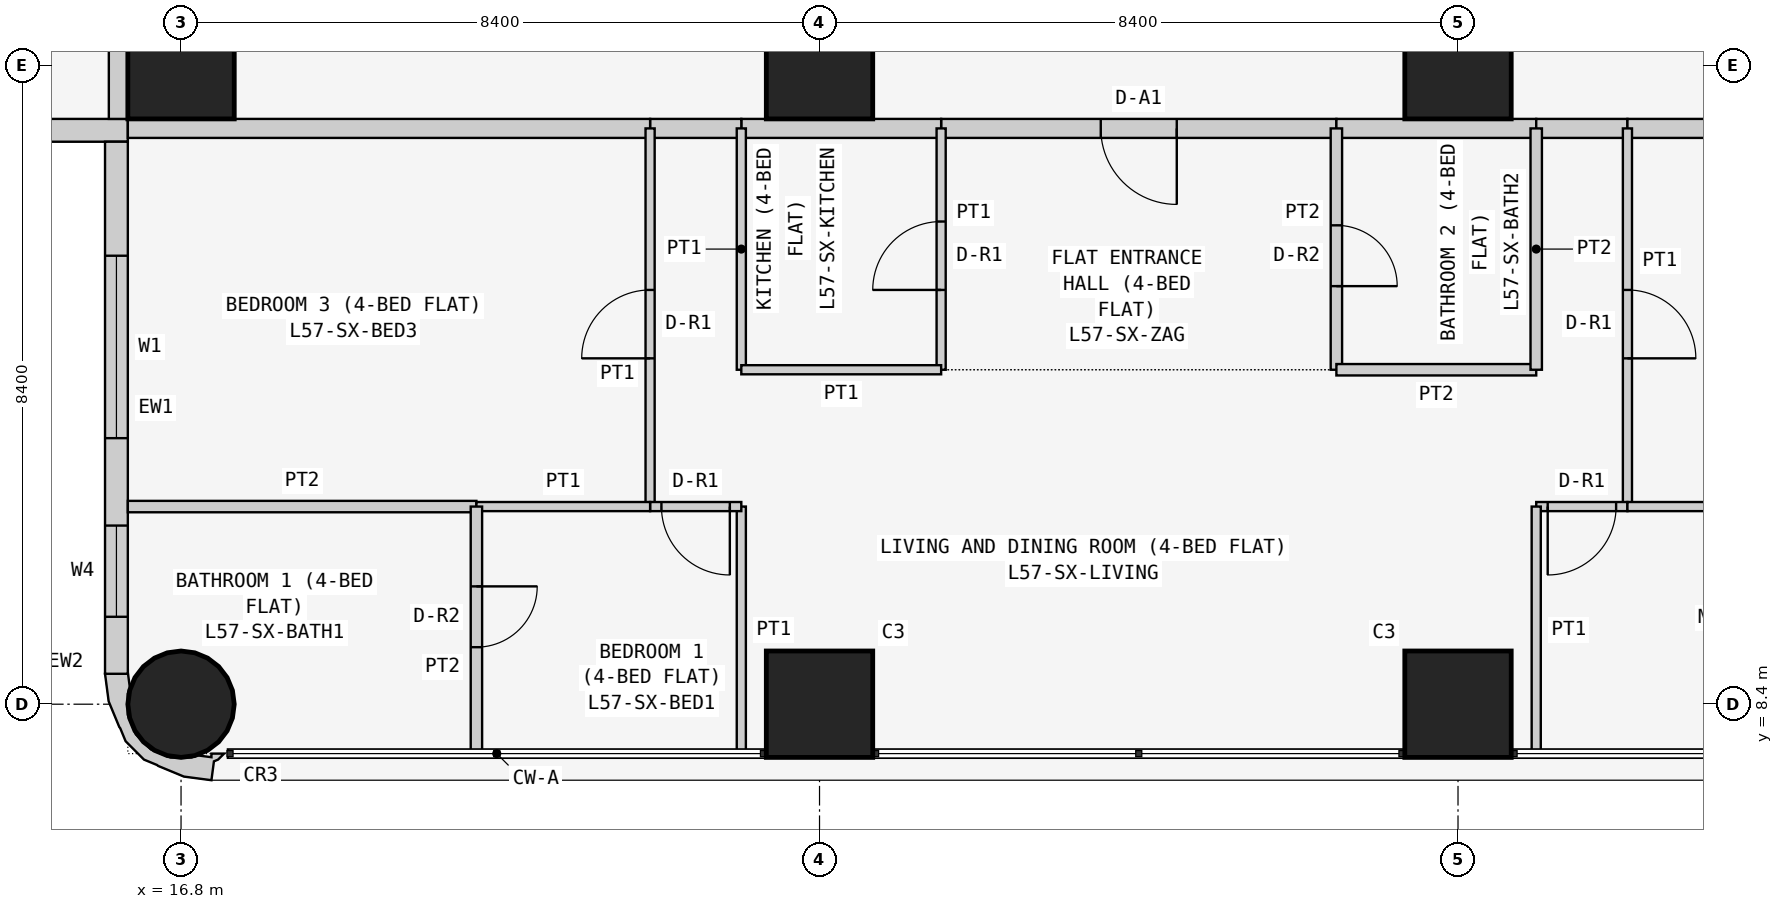
"""IFC4 building model, lengths in metres.
Left out: names, types, materials, properties, quantities, classifications, styles, units other than length and angle.
Written with IfcOpenShell. Run it as: python <this file> out.ifc"""

import sys

from ifc_helpers import new_model, si_unit, direction, frame, frame_2d, origin, origin_2d, place, context, subcontext, project, spatial, polyline, rectangle, circle, outline, extrude, element, fill, save


model = new_model("IFC4")
c1 = context("Model", 3, precision=1e-05, world=origin(), true_north=direction((0.0, 1.0)))
c2 = subcontext(c1, "Body", "Model", "MODEL_VIEW")
j1 = project(units=[si_unit("LENGTHUNIT", "METRE"), si_unit("PLANEANGLEUNIT", "RADIAN")], contexts=[c1])
p1 = place(None, origin())
s1 = spatial("IfcSite", under=j1, at=p1, CompositionType="ELEMENT")
p2 = place(p1, origin())
s2 = spatial("IfcBuilding", under=s1, at=p2, CompositionType="ELEMENT")
p3 = place(p2, frame((0.0, 0.0, 219.3)))
s3 = spatial("IfcBuildingStorey", under=s2, at=p3, CompositionType="ELEMENT", Elevation=219.3)
p4 = place(p3, frame((16.8, 8.4, 0.0), z_axis=(0.0, 0.0, 1.0), x_axis=(1.0, 0.0, 0.0)))
e1 = element("IfcColumn", 1, at=p4, inside=s3, PredefinedType="COLUMN", context=c2, shape_type="SweptSolid", body=[
    extrude(circle(Radius=0.7, at=origin_2d()), origin(), (0.0, 0.0, 1.0), 3.6),
])
for number, where, z_axis, x_axis in (
    (2, (16.8, 16.8, 0.0), (0.0, 0.0, 1.0), (1.0, 0.0, 0.0)),
    (3, (25.2, 8.4, 0.0), (0.0, 0.0, 1.0), (1.0, 0.0, 0.0)),
    (4, (25.2, 16.8, 0.0), (0.0, 0.0, 1.0), (1.0, 0.0, 0.0)),
    (5, (33.6, 8.4, 0.0), (0.0, 0.0, 1.0), (1.0, 0.0, 0.0)),
    (6, (33.6, 16.8, 0.0), (0.0, 0.0, 1.0), (1.0, 0.0, 0.0)),
):
    element("IfcColumn", number, at=place(p3, frame(where, z_axis=z_axis, x_axis=x_axis)), inside=s3, PredefinedType="COLUMN", context=c2, shape_type="SweptSolid", body=[
        extrude(rectangle(XDim=1.4, YDim=1.4, at=origin_2d()), origin(), (0.0, 0.0, 1.0), 3.6),
    ])
p5 = place(p3, frame((0.4, 15.95, 0.0), z_axis=(0.0, 0.0, 1.0), x_axis=(1.0, 0.0, 0.0)))
e7 = element("IfcWall", 7, at=p5, inside=s3, PredefinedType="SOLIDWALL", context=c2, shape_type="SweptSolid", body=[
    extrude(rectangle(XDim=15.7, YDim=0.3, at=frame_2d((7.85, 0.0))), origin(), (0.0, 0.0, 1.0), 3.45),
])
p6 = place(p5, frame((12.4, 0.0, 0.9)))
e8 = element("IfcOpeningElement", 8, at=p6, cuts=e7, PredefinedType="OPENING", context=c2, shape_type="SweptSolid", body=[
    extrude(rectangle(XDim=1.8, YDim=1.5, at=frame_2d((0.9, 0.75))), frame((0.0, 0.16, 0.0), z_axis=(0.0, -1.0, 0.0), x_axis=(1.0, 0.0, 0.0)), (0.0, 0.0, 1.0), 0.32),
])
p7 = place(p5, frame((9.55, 0.0, 1.5)))
e9 = element("IfcOpeningElement", 9, at=p7, cuts=e7, PredefinedType="OPENING", context=c2, shape_type="SweptSolid", body=[
    extrude(rectangle(XDim=0.9, YDim=0.7, at=frame_2d((0.45, 0.35))), frame((0.0, 0.16, 0.0), z_axis=(0.0, -1.0, 0.0), x_axis=(1.0, 0.0, 0.0)), (0.0, 0.0, 1.0), 0.32),
])
p8 = place(p5, frame((5.1, 0.0, 0.9)))
e10 = element("IfcOpeningElement", 10, at=p8, cuts=e7, PredefinedType="OPENING", context=c2, shape_type="SweptSolid", body=[
    extrude(rectangle(XDim=1.8, YDim=1.5, at=frame_2d((0.9, 0.75))), frame((0.0, 0.16, 0.0), z_axis=(0.0, -1.0, 0.0), x_axis=(1.0, 0.0, 0.0)), (0.0, 0.0, 1.0), 0.32),
])
p9 = place(p5, frame((2.0, 0.0, 0.0)))
e11 = element("IfcOpeningElement", 11, at=p9, cuts=e7, PredefinedType="OPENING", context=c2, shape_type="SweptSolid", body=[
    extrude(rectangle(XDim=0.9, YDim=2.4, at=frame_2d((0.45, 1.2))), frame((0.0, 0.16, 0.0), z_axis=(0.0, -1.0, 0.0), x_axis=(1.0, 0.0, 0.0)), (0.0, 0.0, 1.0), 0.32),
])
p10 = place(p5, frame((0.7, 0.0, 0.9)))
e12 = element("IfcOpeningElement", 12, at=p10, cuts=e7, PredefinedType="OPENING", context=c2, shape_type="SweptSolid", body=[
    extrude(rectangle(XDim=1.2, YDim=1.5, at=frame_2d((0.6, 0.75))), frame((0.0, 0.16, 0.0), z_axis=(0.0, -1.0, 0.0), x_axis=(1.0, 0.0, 0.0)), (0.0, 0.0, 1.0), 0.32),
])
p11 = place(p3, frame((15.95, 15.8, 0.0), z_axis=(0.0, 0.0, 1.0), x_axis=(0.0, -1.0, 0.0)))
e13 = element("IfcWall", 13, at=p11, inside=s3, PredefinedType="SOLIDWALL", context=c2, shape_type="SweptSolid", body=[
    extrude(rectangle(XDim=7.0, YDim=0.3, at=frame_2d((3.5, 0.0))), origin(), (0.0, 0.0, 1.0), 3.45),
])
p12 = place(p11, frame((1.5, 0.0, 0.9)))
e14 = element("IfcOpeningElement", 14, at=p12, cuts=e13, PredefinedType="OPENING", context=c2, shape_type="SweptSolid", body=[
    extrude(rectangle(XDim=2.4, YDim=1.5, at=frame_2d((1.2, 0.75))), frame((0.0, 0.16, 0.0), z_axis=(0.0, -1.0, 0.0), x_axis=(1.0, 0.0, 0.0)), (0.0, 0.0, 1.0), 0.32),
])
p13 = place(p11, frame((5.05, 0.0, 0.9)))
e15 = element("IfcOpeningElement", 15, at=p13, cuts=e13, PredefinedType="OPENING", context=c2, shape_type="SweptSolid", body=[
    extrude(rectangle(XDim=1.2, YDim=1.5, at=frame_2d((0.6, 0.75))), frame((0.0, 0.16, 0.0), z_axis=(0.0, -1.0, 0.0), x_axis=(1.0, 0.0, 0.0)), (0.0, 0.0, 1.0), 0.32),
])
p14 = place(p3, frame((16.076, 8.69, 0.0), z_axis=(0.0, 0.0, 1.0), x_axis=(-0.439933741929, -0.898030234854, 0.0)))
e16 = element("IfcWall", 16, at=p14, inside=s3, PredefinedType="SOLIDWALL", context=c2, shape_type="SweptSolid", body=[
    extrude(outline(polyline([(0.664, 1.577), (0.426, 1.497), (0.382, 1.536), (0.276, 1.572), (0.349, 1.423), (0.392, 1.444), (0.453, 1.261), (0.51, 1.211), (0.632, 0.961), (0.65, 0.683), (0.56, 0.419), (0.375, 0.21), (0.125, 0.087), (0.05, 0.082), (-0.127, -0.035), (-0.145, -0.044), (0.022, -0.296), (0.327, -0.094), (0.568, 0.18), (0.578, 0.199), (0.7, 0.337), (0.811, 0.661), (0.799, 0.846), (0.803, 0.866), (0.78, 1.231), (0.664, 1.577)])), origin(), (0.0, 0.0, 1.0), 3.45),
])
p15 = place(p3, frame((32.0, 15.975, 0.0), z_axis=(0.0, 0.0, 1.0), x_axis=(-1.0, 0.0, 0.0)))
e17 = element("IfcWall", 17, at=p15, inside=s3, PredefinedType="PARTITIONING", context=c2, shape_type="SweptSolid", body=[
    extrude(rectangle(XDim=5.2, YDim=0.25, at=frame_2d((2.6, 0.0))), origin(), (0.0, 0.0, 1.0), 3.45),
])
p16 = place(p15, frame((2.1, 0.0, 0.0)))
e18 = element("IfcOpeningElement", 18, at=p16, cuts=e17, PredefinedType="OPENING", context=c2, shape_type="SweptSolid", body=[
    extrude(rectangle(XDim=1.0, YDim=2.1, at=frame_2d((0.5, 1.05))), frame((0.0, 0.135, 0.0), z_axis=(0.0, -1.0, 0.0), x_axis=(1.0, 0.0, 0.0)), (0.0, 0.0, 1.0), 0.27),
])
p17 = place(p3, frame((34.629, 15.975, 0.0), z_axis=(0.0, 0.0, 1.0), x_axis=(-1.0, 0.0, 0.0)))
e19 = element("IfcWall", 19, at=p17, inside=s3, PredefinedType="PARTITIONING", context=c2, shape_type="SweptSolid", body=[
    extrude(rectangle(XDim=2.629, YDim=0.25, at=frame_2d((1.314, 0.0))), origin(), (0.0, 0.0, 1.0), 3.45),
])
p18 = place(p3, frame((26.8, 15.975, 0.0), z_axis=(0.0, 0.0, 1.0), x_axis=(-1.0, 0.0, 0.0)))
e20 = element("IfcWall", 20, at=p18, inside=s3, PredefinedType="PARTITIONING", context=c2, shape_type="SweptSolid", body=[
    extrude(rectangle(XDim=2.629, YDim=0.25, at=frame_2d((1.314, 0.0))), origin(), (0.0, 0.0, 1.0), 3.45),
])
p19 = place(p3, frame((24.171, 15.975, 0.0), z_axis=(0.0, 0.0, 1.0), x_axis=(-1.0, 0.0, 0.0)))
e21 = element("IfcWall", 21, at=p19, inside=s3, PredefinedType="PARTITIONING", context=c2, shape_type="SweptSolid", body=[
    extrude(rectangle(XDim=1.2, YDim=0.25, at=frame_2d((0.6, 0.0))), origin(), (0.0, 0.0, 1.0), 3.45),
])
p20 = place(p3, frame((35.829, 15.975, 0.0), z_axis=(0.0, 0.0, 1.0), x_axis=(-1.0, 0.0, 0.0)))
e22 = element("IfcWall", 22, at=p20, inside=s3, PredefinedType="PARTITIONING", context=c2, shape_type="SweptSolid", body=[
    extrude(rectangle(XDim=1.2, YDim=0.25, at=frame_2d((0.6, 0.0))), origin(), (0.0, 0.0, 1.0), 3.45),
])
for number, where, z_axis, x_axis in (
    (23, (42.7, 15.975, 0.0), (0.0, 0.0, 1.0), (-1.0, 0.0, 0.0)),
    (24, (22.971, 15.975, 0.0), (0.0, 0.0, 1.0), (-1.0, 0.0, 0.0)),
):
    element("IfcWall", number, at=place(p3, frame(where, z_axis=z_axis, x_axis=x_axis)), inside=s3, PredefinedType="PARTITIONING", context=c2, shape_type="SweptSolid", body=[
        extrude(rectangle(XDim=6.871, YDim=0.25, at=frame_2d((3.436, 0.0))), origin(), (0.0, 0.0, 1.0), 3.45),
    ])
p21 = place(p3, frame((15.975, 16.1, 0.0), z_axis=(0.0, 0.0, 1.0), x_axis=(0.0, 1.0, 0.0)))
e25 = element("IfcWall", 25, at=p21, inside=s3, PredefinedType="PARTITIONING", context=c2, shape_type="SweptSolid", body=[
    extrude(rectangle(XDim=6.471, YDim=0.25, at=frame_2d((3.235, 0.0))), origin(), (0.0, 0.0, 1.0), 3.45),
])
p22 = place(p3, frame((32.0, 12.8, 0.0), z_axis=(0.0, 0.0, 1.0), x_axis=(0.0, 1.0, 0.0)))
e26 = element("IfcWall", 26, at=p22, inside=s3, PredefinedType="PARTITIONING", context=c2, shape_type="SweptSolid", body=[
    extrude(rectangle(XDim=3.175, YDim=0.15, at=frame_2d((1.587, 0.0))), origin(), (0.0, 0.0, 1.0), 3.45),
])
p23 = place(p22, frame((1.1, 0.0, 0.0)))
e27 = element("IfcOpeningElement", 27, at=p23, cuts=e26, PredefinedType="OPENING", context=c2, shape_type="SweptSolid", body=[
    extrude(rectangle(XDim=0.8, YDim=2.1, at=frame_2d((0.4, 1.05))), frame((0.0, 0.085, 0.0), z_axis=(0.0, -1.0, 0.0), x_axis=(1.0, 0.0, 0.0)), (0.0, 0.0, 1.0), 0.17),
])
p24 = place(p3, frame((26.8, 15.975, 0.0), z_axis=(0.0, 0.0, 1.0), x_axis=(0.0, -1.0, 0.0)))
e28 = element("IfcWall", 28, at=p24, inside=s3, PredefinedType="PARTITIONING", context=c2, shape_type="SweptSolid", body=[
    extrude(rectangle(XDim=3.175, YDim=0.12, at=frame_2d((1.587, 0.0))), origin(), (0.0, 0.0, 1.0), 3.45),
])
p25 = place(p24, frame((1.225, 0.0, 0.0)))
e29 = element("IfcOpeningElement", 29, at=p25, cuts=e28, PredefinedType="OPENING", context=c2, shape_type="SweptSolid", body=[
    extrude(rectangle(XDim=0.9, YDim=2.1, at=frame_2d((0.45, 1.05))), frame((0.0, 0.07, 0.0), z_axis=(0.0, -1.0, 0.0), x_axis=(1.0, 0.0, 0.0)), (0.0, 0.0, 1.0), 0.14),
])
p26 = place(p3, frame((32.0, 12.8, 0.0), z_axis=(0.0, 0.0, 1.0), x_axis=(1.0, 0.0, 0.0)))
e30 = element("IfcWall", 30, at=p26, inside=s3, PredefinedType="PARTITIONING", context=c2, shape_type="SweptSolid", body=[
    extrude(rectangle(XDim=2.629, YDim=0.15, at=frame_2d((1.314, 0.0))), origin(), (0.0, 0.0, 1.0), 3.45),
])
p27 = place(p3, frame((34.629, 12.8, 0.0), z_axis=(0.0, 0.0, 1.0), x_axis=(0.0, 1.0, 0.0)))
e31 = element("IfcWall", 31, at=p27, inside=s3, PredefinedType="PARTITIONING", context=c2, shape_type="SweptSolid", body=[
    extrude(rectangle(XDim=3.175, YDim=0.15, at=frame_2d((1.587, 0.0))), origin(), (0.0, 0.0, 1.0), 3.45),
])
p28 = place(p3, frame((24.171, 15.975, 0.0), z_axis=(0.0, 0.0, 1.0), x_axis=(0.0, -1.0, 0.0)))
e32 = element("IfcWall", 32, at=p28, inside=s3, PredefinedType="PARTITIONING", context=c2, shape_type="SweptSolid", body=[
    extrude(rectangle(XDim=3.175, YDim=0.12, at=frame_2d((1.587, 0.0))), origin(), (0.0, 0.0, 1.0), 3.45),
])
p29 = place(p3, frame((24.171, 12.8, 0.0), z_axis=(0.0, 0.0, 1.0), x_axis=(1.0, 0.0, 0.0)))
e33 = element("IfcWall", 33, at=p29, inside=s3, PredefinedType="PARTITIONING", context=c2, shape_type="SweptSolid", body=[
    extrude(rectangle(XDim=2.629, YDim=0.12, at=frame_2d((1.314, 0.0))), origin(), (0.0, 0.0, 1.0), 3.45),
])
p30 = place(p3, frame((35.829, 15.975, 0.0), z_axis=(0.0, 0.0, 1.0), x_axis=(0.0, -1.0, 0.0)))
e34 = element("IfcWall", 34, at=p30, inside=s3, PredefinedType="PARTITIONING", context=c2, shape_type="SweptSolid", body=[
    extrude(rectangle(XDim=4.975, YDim=0.12, at=frame_2d((2.488, 0.0))), origin(), (0.0, 0.0, 1.0), 3.45),
])
p31 = place(p30, frame((2.125, 0.0, 0.0)))
e35 = element("IfcOpeningElement", 35, at=p31, cuts=e34, PredefinedType="OPENING", context=c2, shape_type="SweptSolid", body=[
    extrude(rectangle(XDim=0.9, YDim=2.1, at=frame_2d((0.45, 1.05))), frame((0.0, 0.07, 0.0), z_axis=(0.0, -1.0, 0.0), x_axis=(1.0, 0.0, 0.0)), (0.0, 0.0, 1.0), 0.14),
])
p32 = place(p3, frame((35.829, 11.0, 0.0), z_axis=(0.0, 0.0, 1.0), x_axis=(-1.0, 0.0, 0.0)))
e36 = element("IfcWall", 36, at=p32, inside=s3, PredefinedType="PARTITIONING", context=c2, shape_type="SweptSolid", body=[
    extrude(rectangle(XDim=1.2, YDim=0.12, at=frame_2d((0.6, 0.0))), origin(), (0.0, 0.0, 1.0), 3.45),
])
p33 = place(p32, frame((0.149, 0.0, 0.0)))
e37 = element("IfcOpeningElement", 37, at=p33, cuts=e36, PredefinedType="OPENING", context=c2, shape_type="SweptSolid", body=[
    extrude(rectangle(XDim=0.9, YDim=2.1, at=frame_2d((0.45, 1.05))), frame((0.0, 0.07, 0.0), z_axis=(0.0, -1.0, 0.0), x_axis=(1.0, 0.0, 0.0)), (0.0, 0.0, 1.0), 0.14),
])
p34 = place(p3, frame((34.629, 11.0, 0.0), z_axis=(0.0, 0.0, 1.0), x_axis=(0.0, -1.0, 0.0)))
e38 = element("IfcWall", 38, at=p34, inside=s3, PredefinedType="PARTITIONING", context=c2, shape_type="SweptSolid", body=[
    extrude(rectangle(XDim=3.25, YDim=0.12, at=frame_2d((1.625, 0.0))), origin(), (0.0, 0.0, 1.0), 3.45),
])
p35 = place(p3, frame((22.971, 11.0, 0.0), z_axis=(0.0, 0.0, 1.0), x_axis=(0.0, 1.0, 0.0)))
e39 = element("IfcWall", 39, at=p35, inside=s3, PredefinedType="PARTITIONING", context=c2, shape_type="SweptSolid", body=[
    extrude(rectangle(XDim=4.975, YDim=0.12, at=frame_2d((2.488, 0.0))), origin(), (0.0, 0.0, 1.0), 3.45),
])
p36 = place(p35, frame((1.95, 0.0, 0.0)))
e40 = element("IfcOpeningElement", 40, at=p36, cuts=e39, PredefinedType="OPENING", context=c2, shape_type="SweptSolid", body=[
    extrude(rectangle(XDim=0.9, YDim=2.1, at=frame_2d((0.45, 1.05))), frame((0.0, 0.07, 0.0), z_axis=(0.0, -1.0, 0.0), x_axis=(1.0, 0.0, 0.0)), (0.0, 0.0, 1.0), 0.14),
])
p37 = place(p3, frame((24.171, 7.75, 0.0), z_axis=(0.0, 0.0, 1.0), x_axis=(0.0, 1.0, 0.0)))
e41 = element("IfcWall", 41, at=p37, inside=s3, PredefinedType="PARTITIONING", context=c2, shape_type="SweptSolid", body=[
    extrude(rectangle(XDim=3.25, YDim=0.12, at=frame_2d((1.625, 0.0))), origin(), (0.0, 0.0, 1.0), 3.45),
])
p38 = place(p3, frame((24.171, 11.0, 0.0), z_axis=(0.0, 0.0, 1.0), x_axis=(-1.0, 0.0, 0.0)))
e42 = element("IfcWall", 42, at=p38, inside=s3, PredefinedType="PARTITIONING", context=c2, shape_type="SweptSolid", body=[
    extrude(rectangle(XDim=1.2, YDim=0.12, at=frame_2d((0.6, 0.0))), origin(), (0.0, 0.0, 1.0), 3.45),
])
p39 = place(p38, frame((0.151, 0.0, 0.0)))
e43 = element("IfcOpeningElement", 43, at=p39, cuts=e42, PredefinedType="OPENING", context=c2, shape_type="SweptSolid", body=[
    extrude(rectangle(XDim=0.9, YDim=2.1, at=frame_2d((0.45, 1.05))), frame((0.0, 0.07, 0.0), z_axis=(0.0, -1.0, 0.0), x_axis=(1.0, 0.0, 0.0)), (0.0, 0.0, 1.0), 0.14),
])
p40 = place(p3, frame((35.829, 11.0, 0.0), z_axis=(0.0, 0.0, 1.0), x_axis=(1.0, 0.0, 0.0)))
e44 = element("IfcWall", 44, at=p40, inside=s3, PredefinedType="PARTITIONING", context=c2, shape_type="SweptSolid", body=[
    extrude(rectangle(XDim=6.871, YDim=0.12, at=frame_2d((3.436, 0.0))), origin(), (0.0, 0.0, 1.0), 3.45),
])
p41 = place(p3, frame((16.1, 11.0, 0.0), z_axis=(0.0, 0.0, 1.0), x_axis=(1.0, 0.0, 0.0)))
e45 = element("IfcWall", 45, at=p41, inside=s3, PredefinedType="PARTITIONING", context=c2, shape_type="SweptSolid", body=[
    extrude(rectangle(XDim=4.586, YDim=0.15, at=frame_2d((2.293, 0.0))), origin(), (0.0, 0.0, 1.0), 3.45),
])
p42 = place(p3, frame((20.686, 11.0, 0.0), z_axis=(0.0, 0.0, 1.0), x_axis=(1.0, 0.0, 0.0)))
e46 = element("IfcWall", 46, at=p42, inside=s3, PredefinedType="PARTITIONING", context=c2, shape_type="SweptSolid", body=[
    extrude(rectangle(XDim=2.285, YDim=0.12, at=frame_2d((1.143, 0.0))), origin(), (0.0, 0.0, 1.0), 3.45),
])
p43 = place(p3, frame((20.686, 7.75, 0.0), z_axis=(0.0, 0.0, 1.0), x_axis=(0.0, 1.0, 0.0)))
e47 = element("IfcWall", 47, at=p43, inside=s3, PredefinedType="PARTITIONING", context=c2, shape_type="SweptSolid", body=[
    extrude(rectangle(XDim=3.25, YDim=0.15, at=frame_2d((1.625, 0.0))), origin(), (0.0, 0.0, 1.0), 3.45),
])
p44 = place(p43, frame((1.4, 0.0, 0.0)))
e48 = element("IfcOpeningElement", 48, at=p44, cuts=e47, PredefinedType="OPENING", context=c2, shape_type="SweptSolid", body=[
    extrude(rectangle(XDim=0.8, YDim=2.1, at=frame_2d((0.4, 1.05))), frame((0.0, 0.085, 0.0), z_axis=(0.0, -1.0, 0.0), x_axis=(1.0, 0.0, 0.0)), (0.0, 0.0, 1.0), 0.17),
])
p45 = place(p12, origin())
e49 = element("IfcWindow", 49, at=p45, inside=s3, PartitioningType="SINGLE_PANEL", PredefinedType="WINDOW", context=c2, shape_type="SweptSolid", body=[
    extrude(rectangle(XDim=2.4, YDim=1.5, at=frame_2d((1.2, 0.75))), frame((0.0, 0.03, 0.0), z_axis=(0.0, -1.0, 0.0), x_axis=(1.0, 0.0, 0.0)), (0.0, 0.0, 1.0), 0.06),
])
fill(e14, e49)
p46 = place(p13, origin())
e50 = element("IfcWindow", 50, at=p46, inside=s3, PartitioningType="SINGLE_PANEL", PredefinedType="WINDOW", context=c2, shape_type="SweptSolid", body=[
    extrude(rectangle(XDim=1.2, YDim=1.5, at=frame_2d((0.6, 0.75))), frame((0.0, 0.03, 0.0), z_axis=(0.0, -1.0, 0.0), x_axis=(1.0, 0.0, 0.0)), (0.0, 0.0, 1.0), 0.06),
])
fill(e15, e50)
p47 = place(p16, origin())
e51 = element("IfcDoor", 51, at=p47, inside=s3, OperationType="SINGLE_SWING_LEFT", PredefinedType="DOOR", context=c2, shape_type="SweptSolid", body=[
    extrude(rectangle(XDim=1.0, YDim=2.1, at=frame_2d((0.5, 1.05))), frame((0.0, 0.025, 0.0), z_axis=(0.0, -1.0, 0.0), x_axis=(1.0, 0.0, 0.0)), (0.0, 0.0, 1.0), 0.05),
])
fill(e18, e51)
p48 = place(p23, frame((0.8, 0.0, 0.0), z_axis=(0.0, 0.0, 1.0), x_axis=(-1.0, 0.0, 0.0)))
e52 = element("IfcDoor", 52, at=p48, inside=s3, OperationType="SINGLE_SWING_RIGHT", PredefinedType="DOOR", context=c2, shape_type="SweptSolid", body=[
    extrude(rectangle(XDim=0.8, YDim=2.1, at=frame_2d((0.4, 1.05))), frame((0.0, 0.025, 0.0), z_axis=(0.0, -1.0, 0.0), x_axis=(1.0, 0.0, 0.0)), (0.0, 0.0, 1.0), 0.05),
])
fill(e27, e52)
p49 = place(p25, frame((0.9, 0.0, 0.0), z_axis=(0.0, 0.0, 1.0), x_axis=(-1.0, 0.0, 0.0)))
e53 = element("IfcDoor", 53, at=p49, inside=s3, OperationType="SINGLE_SWING_LEFT", PredefinedType="DOOR", context=c2, shape_type="SweptSolid", body=[
    extrude(rectangle(XDim=0.9, YDim=2.1, at=frame_2d((0.45, 1.05))), frame((0.0, 0.025, 0.0), z_axis=(0.0, -1.0, 0.0), x_axis=(1.0, 0.0, 0.0)), (0.0, 0.0, 1.0), 0.05),
])
fill(e29, e53)
p50 = place(p31, origin())
e54 = element("IfcDoor", 54, at=p50, inside=s3, OperationType="SINGLE_SWING_RIGHT", PredefinedType="DOOR", context=c2, shape_type="SweptSolid", body=[
    extrude(rectangle(XDim=0.9, YDim=2.1, at=frame_2d((0.45, 1.05))), frame((0.0, 0.025, 0.0), z_axis=(0.0, -1.0, 0.0), x_axis=(1.0, 0.0, 0.0)), (0.0, 0.0, 1.0), 0.05),
])
fill(e35, e54)
p51 = place(p33, origin())
e55 = element("IfcDoor", 55, at=p51, inside=s3, OperationType="SINGLE_SWING_RIGHT", PredefinedType="DOOR", context=c2, shape_type="SweptSolid", body=[
    extrude(rectangle(XDim=0.9, YDim=2.1, at=frame_2d((0.45, 1.05))), frame((0.0, 0.025, 0.0), z_axis=(0.0, -1.0, 0.0), x_axis=(1.0, 0.0, 0.0)), (0.0, 0.0, 1.0), 0.05),
])
fill(e37, e55)
p52 = place(p36, origin())
e56 = element("IfcDoor", 56, at=p52, inside=s3, OperationType="SINGLE_SWING_LEFT", PredefinedType="DOOR", context=c2, shape_type="SweptSolid", body=[
    extrude(rectangle(XDim=0.9, YDim=2.1, at=frame_2d((0.45, 1.05))), frame((0.0, 0.025, 0.0), z_axis=(0.0, -1.0, 0.0), x_axis=(1.0, 0.0, 0.0)), (0.0, 0.0, 1.0), 0.05),
])
fill(e40, e56)
p53 = place(p39, origin())
e57 = element("IfcDoor", 57, at=p53, inside=s3, OperationType="SINGLE_SWING_LEFT", PredefinedType="DOOR", context=c2, shape_type="SweptSolid", body=[
    extrude(rectangle(XDim=0.9, YDim=2.1, at=frame_2d((0.45, 1.05))), frame((0.0, 0.025, 0.0), z_axis=(0.0, -1.0, 0.0), x_axis=(1.0, 0.0, 0.0)), (0.0, 0.0, 1.0), 0.05),
])
fill(e43, e57)
p54 = place(p44, frame((0.8, 0.0, 0.0), z_axis=(0.0, 0.0, 1.0), x_axis=(-1.0, 0.0, 0.0)))
e58 = element("IfcDoor", 58, at=p54, inside=s3, OperationType="SINGLE_SWING_LEFT", PredefinedType="DOOR", context=c2, shape_type="SweptSolid", body=[
    extrude(rectangle(XDim=0.8, YDim=2.1, at=frame_2d((0.4, 1.05))), frame((0.0, 0.025, 0.0), z_axis=(0.0, -1.0, 0.0), x_axis=(1.0, 0.0, 0.0)), (0.0, 0.0, 1.0), 0.05),
])
fill(e48, e58)
save(model, sys.argv[1])
